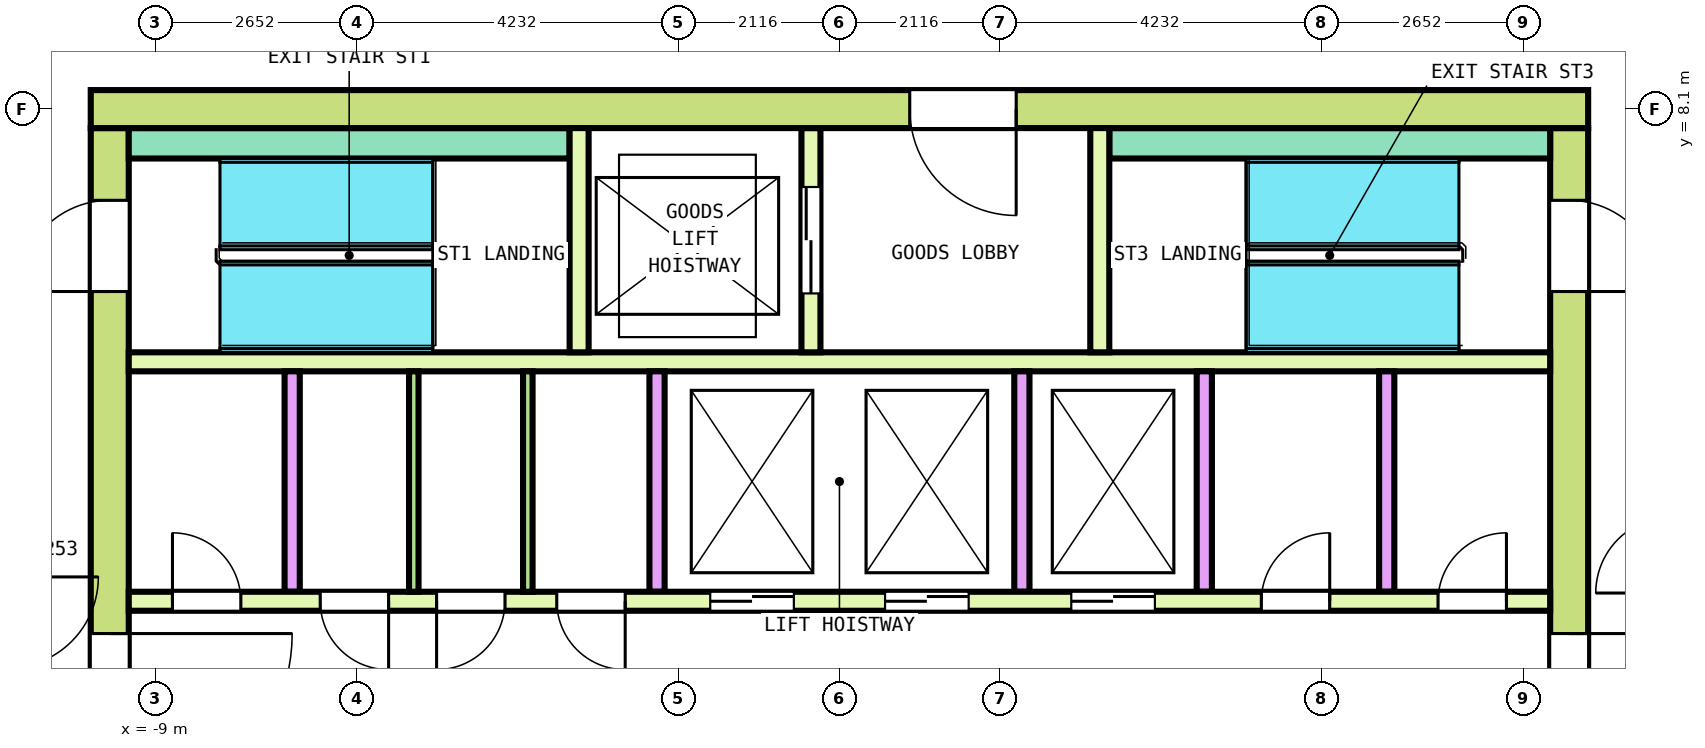
"""IFC4 building model, lengths in metres.
Left out: names, types, materials, properties, quantities, classifications, styles, units other than length and angle.
Written with IfcOpenShell. Run it as: python <this file> out.ifc"""

import sys

from ifc_helpers import new_model, si_unit, direction, frame, frame_2d, origin, place, context, subcontext, project, spatial, rectangle, extrude, element, fill, save


model = new_model("IFC4")
c1 = context("Model", 3, precision=1e-05, world=origin(), true_north=direction((0.0, 1.0)))
c2 = subcontext(c1, "Body", "Model", "MODEL_VIEW")
j1 = project(units=[si_unit("LENGTHUNIT", "METRE"), si_unit("PLANEANGLEUNIT", "RADIAN")], contexts=[c1])
p1 = place(None, origin())
s1 = spatial("IfcSite", under=j1, at=p1, CompositionType="ELEMENT")
p2 = place(p1, origin())
s2 = spatial("IfcBuilding", under=s1, at=p2, CompositionType="ELEMENT")
p3 = place(p2, frame((0.0, 0.0, 295.0)))
s3 = spatial("IfcBuildingStorey", under=s2, at=p3, CompositionType="ELEMENT", Elevation=295.0)
p4 = place(p3, frame((-9.85, 8.1, 0.0), z_axis=(0.0, 0.0, 1.0), x_axis=(1.0, 0.0, 0.0)))
e1 = element("IfcWall", 1, at=p4, inside=s3, PredefinedType="SHEAR", context=c2, shape_type="SweptSolid", body=[
    extrude(rectangle(XDim=19.7, YDim=0.5, at=frame_2d((9.85, 0.0))), origin(), (0.0, 0.0, 1.0), 3.7),
])
p5 = place(p4, frame((10.775, 0.0, 0.0)))
e2 = element("IfcOpeningElement", 2, at=p5, cuts=e1, PredefinedType="OPENING", context=c2, shape_type="SweptSolid", body=[
    extrude(rectangle(XDim=1.4, YDim=2.1, at=frame_2d((0.7, 1.05))), frame((0.0, 0.26, 0.0), z_axis=(0.0, -1.0, 0.0), x_axis=(1.0, 0.0, 0.0)), (0.0, 0.0, 1.0), 0.52),
])
p6 = place(p3, frame((-9.6, -7.85, 0.0), z_axis=(0.0, 0.0, 1.0), x_axis=(0.0, 1.0, 0.0)))
e3 = element("IfcWall", 3, at=p6, inside=s3, PredefinedType="SHEAR", context=c2, shape_type="SweptSolid", body=[
    extrude(rectangle(XDim=15.7, YDim=0.5, at=frame_2d((7.85, 0.0))), origin(), (0.0, 0.0, 1.0), 3.7),
])
p7 = place(p6, frame((6.65, 0.0, 0.0)))
e4 = element("IfcOpeningElement", 4, at=p7, cuts=e3, PredefinedType="OPENING", context=c2, shape_type="SweptSolid", body=[
    extrude(rectangle(XDim=2.4, YDim=2.1, at=frame_2d((1.2, 1.05))), frame((0.0, 0.26, 0.0), z_axis=(0.0, -1.0, 0.0), x_axis=(1.0, 0.0, 0.0)), (0.0, 0.0, 1.0), 0.52),
])
p8 = place(p6, frame((13.55, 0.0, 0.0)))
e5 = element("IfcOpeningElement", 5, at=p8, cuts=e3, PredefinedType="OPENING", context=c2, shape_type="SweptSolid", body=[
    extrude(rectangle(XDim=1.2, YDim=2.1, at=frame_2d((0.6, 1.05))), frame((0.0, 0.26, 0.0), z_axis=(0.0, -1.0, 0.0), x_axis=(1.0, 0.0, 0.0)), (0.0, 0.0, 1.0), 0.52),
])
p9 = place(p6, frame((0.95, 0.0, 0.0)))
e6 = element("IfcOpeningElement", 6, at=p9, cuts=e3, PredefinedType="OPENING", context=c2, shape_type="SweptSolid", body=[
    extrude(rectangle(XDim=1.2, YDim=2.1, at=frame_2d((0.6, 1.05))), frame((0.0, 0.26, 0.0), z_axis=(0.0, -1.0, 0.0), x_axis=(1.0, 0.0, 0.0)), (0.0, 0.0, 1.0), 0.52),
])
p10 = place(p3, frame((9.6, -7.85, 0.0), z_axis=(0.0, 0.0, 1.0), x_axis=(0.0, 1.0, 0.0)))
e7 = element("IfcWall", 7, at=p10, inside=s3, PredefinedType="SHEAR", context=c2, shape_type="SweptSolid", body=[
    extrude(rectangle(XDim=15.7, YDim=0.5, at=frame_2d((7.85, 0.0))), origin(), (0.0, 0.0, 1.0), 3.7),
])
p11 = place(p10, frame((6.65, 0.0, 0.0)))
e8 = element("IfcOpeningElement", 8, at=p11, cuts=e7, PredefinedType="OPENING", context=c2, shape_type="SweptSolid", body=[
    extrude(rectangle(XDim=2.4, YDim=2.1, at=frame_2d((1.2, 1.05))), frame((0.0, 0.26, 0.0), z_axis=(0.0, -1.0, 0.0), x_axis=(1.0, 0.0, 0.0)), (0.0, 0.0, 1.0), 0.52),
])
p12 = place(p10, frame((13.55, 0.0, 0.0)))
e9 = element("IfcOpeningElement", 9, at=p12, cuts=e7, PredefinedType="OPENING", context=c2, shape_type="SweptSolid", body=[
    extrude(rectangle(XDim=1.2, YDim=2.1, at=frame_2d((0.6, 1.05))), frame((0.0, 0.26, 0.0), z_axis=(0.0, -1.0, 0.0), x_axis=(1.0, 0.0, 0.0)), (0.0, 0.0, 1.0), 0.52),
])
p13 = place(p10, frame((1.05, 0.0, 0.0)))
e10 = element("IfcOpeningElement", 10, at=p13, cuts=e7, PredefinedType="OPENING", context=c2, shape_type="SweptSolid", body=[
    extrude(rectangle(XDim=1.0, YDim=2.1, at=frame_2d((0.5, 1.05))), frame((0.0, 0.26, 0.0), z_axis=(0.0, -1.0, 0.0), x_axis=(1.0, 0.0, 0.0)), (0.0, 0.0, 1.0), 0.52),
])
p14 = place(p3, frame((-9.35, 1.625, 0.0), z_axis=(0.0, 0.0, 1.0), x_axis=(1.0, 0.0, 0.0)))
e11 = element("IfcWall", 11, at=p14, inside=s3, PredefinedType="SOLIDWALL", context=c2, shape_type="SweptSolid", body=[
    extrude(rectangle(XDim=18.7, YDim=0.25, at=frame_2d((9.35, 0.0))), origin(), (0.0, 0.0, 1.0), 3.7),
])
p15 = place(p14, frame((7.65, 0.0, 0.0)))
e12 = element("IfcOpeningElement", 12, at=p15, cuts=e11, PredefinedType="OPENING", context=c2, shape_type="SweptSolid", body=[
    extrude(rectangle(XDim=1.1, YDim=2.1, at=frame_2d((0.55, 1.05))), frame((0.0, 0.135, 0.0), z_axis=(0.0, -1.0, 0.0), x_axis=(1.0, 0.0, 0.0)), (0.0, 0.0, 1.0), 0.27),
])
p16 = place(p14, frame((9.95, 0.0, 0.0)))
e13 = element("IfcOpeningElement", 13, at=p16, cuts=e11, PredefinedType="OPENING", context=c2, shape_type="SweptSolid", body=[
    extrude(rectangle(XDim=1.1, YDim=2.1, at=frame_2d((0.55, 1.05))), frame((0.0, 0.135, 0.0), z_axis=(0.0, -1.0, 0.0), x_axis=(1.0, 0.0, 0.0)), (0.0, 0.0, 1.0), 0.27),
])
p17 = place(p14, frame((12.4, 0.0, 0.0)))
e14 = element("IfcOpeningElement", 14, at=p17, cuts=e11, PredefinedType="OPENING", context=c2, shape_type="SweptSolid", body=[
    extrude(rectangle(XDim=1.1, YDim=2.1, at=frame_2d((0.55, 1.05))), frame((0.0, 0.135, 0.0), z_axis=(0.0, -1.0, 0.0), x_axis=(1.0, 0.0, 0.0)), (0.0, 0.0, 1.0), 0.27),
])
p18 = place(p14, frame((0.575, 0.0, 0.0)))
e15 = element("IfcOpeningElement", 15, at=p18, cuts=e11, PredefinedType="OPENING", context=c2, shape_type="SweptSolid", body=[
    extrude(rectangle(XDim=0.9, YDim=2.1, at=frame_2d((0.45, 1.05))), frame((0.0, 0.135, 0.0), z_axis=(0.0, -1.0, 0.0), x_axis=(1.0, 0.0, 0.0)), (0.0, 0.0, 1.0), 0.27),
])
p19 = place(p14, frame((2.519, 0.0, 0.0)))
e16 = element("IfcOpeningElement", 16, at=p19, cuts=e11, PredefinedType="OPENING", context=c2, shape_type="SweptSolid", body=[
    extrude(rectangle(XDim=0.9, YDim=2.1, at=frame_2d((0.45, 1.05))), frame((0.0, 0.135, 0.0), z_axis=(0.0, -1.0, 0.0), x_axis=(1.0, 0.0, 0.0)), (0.0, 0.0, 1.0), 0.27),
])
p20 = place(p14, frame((4.05, 0.0, 0.0)))
e17 = element("IfcOpeningElement", 17, at=p20, cuts=e11, PredefinedType="OPENING", context=c2, shape_type="SweptSolid", body=[
    extrude(rectangle(XDim=0.9, YDim=2.1, at=frame_2d((0.45, 1.05))), frame((0.0, 0.135, 0.0), z_axis=(0.0, -1.0, 0.0), x_axis=(1.0, 0.0, 0.0)), (0.0, 0.0, 1.0), 0.27),
])
p21 = place(p14, frame((5.631, 0.0, 0.0)))
e18 = element("IfcOpeningElement", 18, at=p21, cuts=e11, PredefinedType="OPENING", context=c2, shape_type="SweptSolid", body=[
    extrude(rectangle(XDim=0.9, YDim=2.1, at=frame_2d((0.45, 1.05))), frame((0.0, 0.135, 0.0), z_axis=(0.0, -1.0, 0.0), x_axis=(1.0, 0.0, 0.0)), (0.0, 0.0, 1.0), 0.27),
])
p22 = place(p14, frame((14.9, 0.0, 0.0)))
e19 = element("IfcOpeningElement", 19, at=p22, cuts=e11, PredefinedType="OPENING", context=c2, shape_type="SweptSolid", body=[
    extrude(rectangle(XDim=0.9, YDim=2.1, at=frame_2d((0.45, 1.05))), frame((0.0, 0.135, 0.0), z_axis=(0.0, -1.0, 0.0), x_axis=(1.0, 0.0, 0.0)), (0.0, 0.0, 1.0), 0.27),
])
p23 = place(p14, frame((17.225, 0.0, 0.0)))
e20 = element("IfcOpeningElement", 20, at=p23, cuts=e11, PredefinedType="OPENING", context=c2, shape_type="SweptSolid", body=[
    extrude(rectangle(XDim=0.9, YDim=2.1, at=frame_2d((0.45, 1.05))), frame((0.0, 0.135, 0.0), z_axis=(0.0, -1.0, 0.0), x_axis=(1.0, 0.0, 0.0)), (0.0, 0.0, 1.0), 0.27),
])
p24 = place(p3, frame((-9.35, 4.775, 0.0), z_axis=(0.0, 0.0, 1.0), x_axis=(1.0, 0.0, 0.0)))
e21 = element("IfcWall", 21, at=p24, inside=s3, PredefinedType="SOLIDWALL", context=c2, shape_type="SweptSolid", body=[
    extrude(rectangle(XDim=18.7, YDim=0.25, at=frame_2d((9.35, 0.0))), origin(), (0.0, 0.0, 1.0), 3.7),
])
for number, where, z_axis, x_axis in (
    (22, (-7.2, 1.75, 0.0), (0.0, 0.0, 1.0), (0.0, 1.0, 0.0)),
    (23, (-2.4, 1.75, 0.0), (0.0, 0.0, 1.0), (0.0, 1.0, 0.0)),
    (24, (2.4, 1.75, 0.0), (0.0, 0.0, 1.0), (0.0, 1.0, 0.0)),
    (25, (4.8, 1.75, 0.0), (0.0, 0.0, 1.0), (0.0, 1.0, 0.0)),
    (26, (7.2, 1.75, 0.0), (0.0, 0.0, 1.0), (0.0, 1.0, 0.0)),
):
    element("IfcWall", number, at=place(p3, frame(where, z_axis=z_axis, x_axis=x_axis)), inside=s3, PredefinedType="SOLIDWALL", context=c2, shape_type="SweptSolid", body=[
        extrude(rectangle(XDim=2.9, YDim=0.2, at=frame_2d((1.45, 0.0))), origin(), (0.0, 0.0, 1.0), 3.7),
    ])
for number, where, z_axis, x_axis in (
    (27, (-9.35, 7.65, 0.0), (0.0, 0.0, 1.0), (1.0, 0.0, 0.0)),
    (28, (3.55, 7.65, 0.0), (0.0, 0.0, 1.0), (1.0, 0.0, 0.0)),
):
    element("IfcWall", number, at=place(p3, frame(where, z_axis=z_axis, x_axis=x_axis)), inside=s3, PredefinedType="SOLIDWALL", context=c2, shape_type="SweptSolid", body=[
        extrude(rectangle(XDim=5.8, YDim=0.4, at=frame_2d((2.9, 0.0))), origin(), (0.0, 0.0, 1.0), 3.7),
    ])
p25 = place(p3, frame((-3.425, 4.9, 0.0), z_axis=(0.0, 0.0, 1.0), x_axis=(0.0, 1.0, 0.0)))
e29 = element("IfcWall", 29, at=p25, inside=s3, PredefinedType="SOLIDWALL", context=c2, shape_type="SweptSolid", body=[
    extrude(rectangle(XDim=2.95, YDim=0.25, at=frame_2d((1.475, 0.0))), origin(), (0.0, 0.0, 1.0), 3.7),
])
p26 = place(p3, frame((-0.375, 4.9, 0.0), z_axis=(0.0, 0.0, 1.0), x_axis=(0.0, 1.0, 0.0)))
e30 = element("IfcWall", 30, at=p26, inside=s3, PredefinedType="SOLIDWALL", context=c2, shape_type="SweptSolid", body=[
    extrude(rectangle(XDim=2.95, YDim=0.25, at=frame_2d((1.475, 0.0))), origin(), (0.0, 0.0, 1.0), 3.7),
])
p27 = place(p26, frame((0.775, 0.0, 0.0)))
e31 = element("IfcOpeningElement", 31, at=p27, cuts=e30, PredefinedType="OPENING", context=c2, shape_type="SweptSolid", body=[
    extrude(rectangle(XDim=1.4, YDim=2.1, at=frame_2d((0.7, 1.05))), frame((0.0, 0.135, 0.0), z_axis=(0.0, -1.0, 0.0), x_axis=(1.0, 0.0, 0.0)), (0.0, 0.0, 1.0), 0.27),
])
p28 = place(p3, frame((3.425, 4.9, 0.0), z_axis=(0.0, 0.0, 1.0), x_axis=(0.0, 1.0, 0.0)))
e32 = element("IfcWall", 32, at=p28, inside=s3, PredefinedType="SOLIDWALL", context=c2, shape_type="SweptSolid", body=[
    extrude(rectangle(XDim=2.95, YDim=0.25, at=frame_2d((1.475, 0.0))), origin(), (0.0, 0.0, 1.0), 3.7),
])
for number, where, z_axis, x_axis in (
    (33, (-5.6, 1.75, 0.0), (0.0, 0.0, 1.0), (0.0, 1.0, 0.0)),
    (34, (-4.1, 1.75, 0.0), (0.0, 0.0, 1.0), (0.0, 1.0, 0.0)),
):
    element("IfcWall", number, at=place(p3, frame(where, z_axis=z_axis, x_axis=x_axis)), inside=s3, PredefinedType="PARTITIONING", context=c2, shape_type="SweptSolid", body=[
        extrude(rectangle(XDim=2.9, YDim=0.125, at=frame_2d((1.45, 0.0))), origin(), (0.0, 0.0, 1.0), 3.7),
    ])
p29 = place(p15, origin())
e35 = element("IfcDoor", 35, at=p29, inside=s3, OperationType="DOUBLE_DOOR_SLIDING", PredefinedType="DOOR", context=c2, shape_type="SweptSolid", body=[
    extrude(rectangle(XDim=1.1, YDim=2.1, at=frame_2d((0.55, 1.05))), frame((0.0, 0.075, 0.0), z_axis=(0.0, -1.0, 0.0), x_axis=(1.0, 0.0, 0.0)), (0.0, 0.0, 1.0), 0.15),
])
fill(e12, e35)
p30 = place(p16, origin())
e36 = element("IfcDoor", 36, at=p30, inside=s3, OperationType="DOUBLE_DOOR_SLIDING", PredefinedType="DOOR", context=c2, shape_type="SweptSolid", body=[
    extrude(rectangle(XDim=1.1, YDim=2.1, at=frame_2d((0.55, 1.05))), frame((0.0, 0.075, 0.0), z_axis=(0.0, -1.0, 0.0), x_axis=(1.0, 0.0, 0.0)), (0.0, 0.0, 1.0), 0.15),
])
fill(e13, e36)
p31 = place(p17, origin())
e37 = element("IfcDoor", 37, at=p31, inside=s3, OperationType="DOUBLE_DOOR_SLIDING", PredefinedType="DOOR", context=c2, shape_type="SweptSolid", body=[
    extrude(rectangle(XDim=1.1, YDim=2.1, at=frame_2d((0.55, 1.05))), frame((0.0, 0.075, 0.0), z_axis=(0.0, -1.0, 0.0), x_axis=(1.0, 0.0, 0.0)), (0.0, 0.0, 1.0), 0.15),
])
fill(e14, e37)
p32 = place(p27, origin())
e38 = element("IfcDoor", 38, at=p32, inside=s3, OperationType="DOUBLE_DOOR_SLIDING", PredefinedType="DOOR", context=c2, shape_type="SweptSolid", body=[
    extrude(rectangle(XDim=1.4, YDim=2.1, at=frame_2d((0.7, 1.05))), frame((0.0, 0.075, 0.0), z_axis=(0.0, -1.0, 0.0), x_axis=(1.0, 0.0, 0.0)), (0.0, 0.0, 1.0), 0.15),
])
fill(e31, e38)
p33 = place(p7, origin())
e39 = element("IfcDoor", 39, at=p33, inside=s3, OperationType="DOUBLE_DOOR_SINGLE_SWING", PredefinedType="DOOR", context=c2, shape_type="SweptSolid", body=[
    extrude(rectangle(XDim=2.4, YDim=2.1, at=frame_2d((1.2, 1.05))), frame((0.0, 0.2, 0.0), z_axis=(0.0, -1.0, 0.0), x_axis=(1.0, 0.0, 0.0)), (0.0, 0.0, 1.0), 0.4),
])
fill(e4, e39)
p34 = place(p11, origin())
e40 = element("IfcDoor", 40, at=p34, inside=s3, OperationType="DOUBLE_DOOR_SINGLE_SWING", PredefinedType="DOOR", context=c2, shape_type="SweptSolid", body=[
    extrude(rectangle(XDim=2.4, YDim=2.1, at=frame_2d((1.2, 1.05))), frame((0.0, 0.2, 0.0), z_axis=(0.0, -1.0, 0.0), x_axis=(1.0, 0.0, 0.0)), (0.0, 0.0, 1.0), 0.4),
])
fill(e8, e40)
p35 = place(p8, origin())
e41 = element("IfcDoor", 41, at=p35, inside=s3, OperationType="SINGLE_SWING_RIGHT", PredefinedType="DOOR", context=c2, shape_type="SweptSolid", body=[
    extrude(rectangle(XDim=1.2, YDim=2.1, at=frame_2d((0.6, 1.05))), frame((0.0, 0.2, 0.0), z_axis=(0.0, -1.0, 0.0), x_axis=(1.0, 0.0, 0.0)), (0.0, 0.0, 1.0), 0.4),
])
fill(e5, e41)
p36 = place(p12, origin())
e42 = element("IfcDoor", 42, at=p36, inside=s3, OperationType="SINGLE_SWING_RIGHT", PredefinedType="DOOR", context=c2, shape_type="SweptSolid", body=[
    extrude(rectangle(XDim=1.2, YDim=2.1, at=frame_2d((0.6, 1.05))), frame((0.0, 0.2, 0.0), z_axis=(0.0, -1.0, 0.0), x_axis=(1.0, 0.0, 0.0)), (0.0, 0.0, 1.0), 0.4),
])
fill(e9, e42)
p37 = place(p5, origin())
e43 = element("IfcDoor", 43, at=p37, inside=s3, OperationType="DOUBLE_DOOR_SINGLE_SWING", PredefinedType="DOOR", context=c2, shape_type="SweptSolid", body=[
    extrude(rectangle(XDim=1.4, YDim=2.1, at=frame_2d((0.7, 1.05))), frame((0.0, 0.2, 0.0), z_axis=(0.0, -1.0, 0.0), x_axis=(1.0, 0.0, 0.0)), (0.0, 0.0, 1.0), 0.4),
])
fill(e2, e43)
p38 = place(p18, origin())
e44 = element("IfcDoor", 44, at=p38, inside=s3, OperationType="SINGLE_SWING_RIGHT", PredefinedType="DOOR", context=c2, shape_type="SweptSolid", body=[
    extrude(rectangle(XDim=0.9, YDim=2.1, at=frame_2d((0.45, 1.05))), frame((0.0, 0.075, 0.0), z_axis=(0.0, -1.0, 0.0), x_axis=(1.0, 0.0, 0.0)), (0.0, 0.0, 1.0), 0.15),
])
fill(e15, e44)
p39 = place(p19, origin())
e45 = element("IfcDoor", 45, at=p39, inside=s3, OperationType="SINGLE_SWING_LEFT", PredefinedType="DOOR", context=c2, shape_type="SweptSolid", body=[
    extrude(rectangle(XDim=0.9, YDim=2.1, at=frame_2d((0.45, 1.05))), frame((0.0, 0.075, 0.0), z_axis=(0.0, -1.0, 0.0), x_axis=(1.0, 0.0, 0.0)), (0.0, 0.0, 1.0), 0.15),
])
fill(e16, e45)
p40 = place(p20, origin())
e46 = element("IfcDoor", 46, at=p40, inside=s3, OperationType="SINGLE_SWING_RIGHT", PredefinedType="DOOR", context=c2, shape_type="SweptSolid", body=[
    extrude(rectangle(XDim=0.9, YDim=2.1, at=frame_2d((0.45, 1.05))), frame((0.0, 0.075, 0.0), z_axis=(0.0, -1.0, 0.0), x_axis=(1.0, 0.0, 0.0)), (0.0, 0.0, 1.0), 0.15),
])
fill(e17, e46)
p41 = place(p21, origin())
e47 = element("IfcDoor", 47, at=p41, inside=s3, OperationType="SINGLE_SWING_LEFT", PredefinedType="DOOR", context=c2, shape_type="SweptSolid", body=[
    extrude(rectangle(XDim=0.9, YDim=2.1, at=frame_2d((0.45, 1.05))), frame((0.0, 0.075, 0.0), z_axis=(0.0, -1.0, 0.0), x_axis=(1.0, 0.0, 0.0)), (0.0, 0.0, 1.0), 0.15),
])
fill(e18, e47)
p42 = place(p22, origin())
e48 = element("IfcDoor", 48, at=p42, inside=s3, OperationType="SINGLE_SWING_RIGHT", PredefinedType="DOOR", context=c2, shape_type="SweptSolid", body=[
    extrude(rectangle(XDim=0.9, YDim=2.1, at=frame_2d((0.45, 1.05))), frame((0.0, 0.075, 0.0), z_axis=(0.0, -1.0, 0.0), x_axis=(1.0, 0.0, 0.0)), (0.0, 0.0, 1.0), 0.15),
])
fill(e19, e48)
p43 = place(p23, origin())
e49 = element("IfcDoor", 49, at=p43, inside=s3, OperationType="SINGLE_SWING_LEFT", PredefinedType="DOOR", context=c2, shape_type="SweptSolid", body=[
    extrude(rectangle(XDim=0.9, YDim=2.1, at=frame_2d((0.45, 1.05))), frame((0.0, 0.075, 0.0), z_axis=(0.0, -1.0, 0.0), x_axis=(1.0, 0.0, 0.0)), (0.0, 0.0, 1.0), 0.15),
])
fill(e20, e49)
save(model, sys.argv[1])
